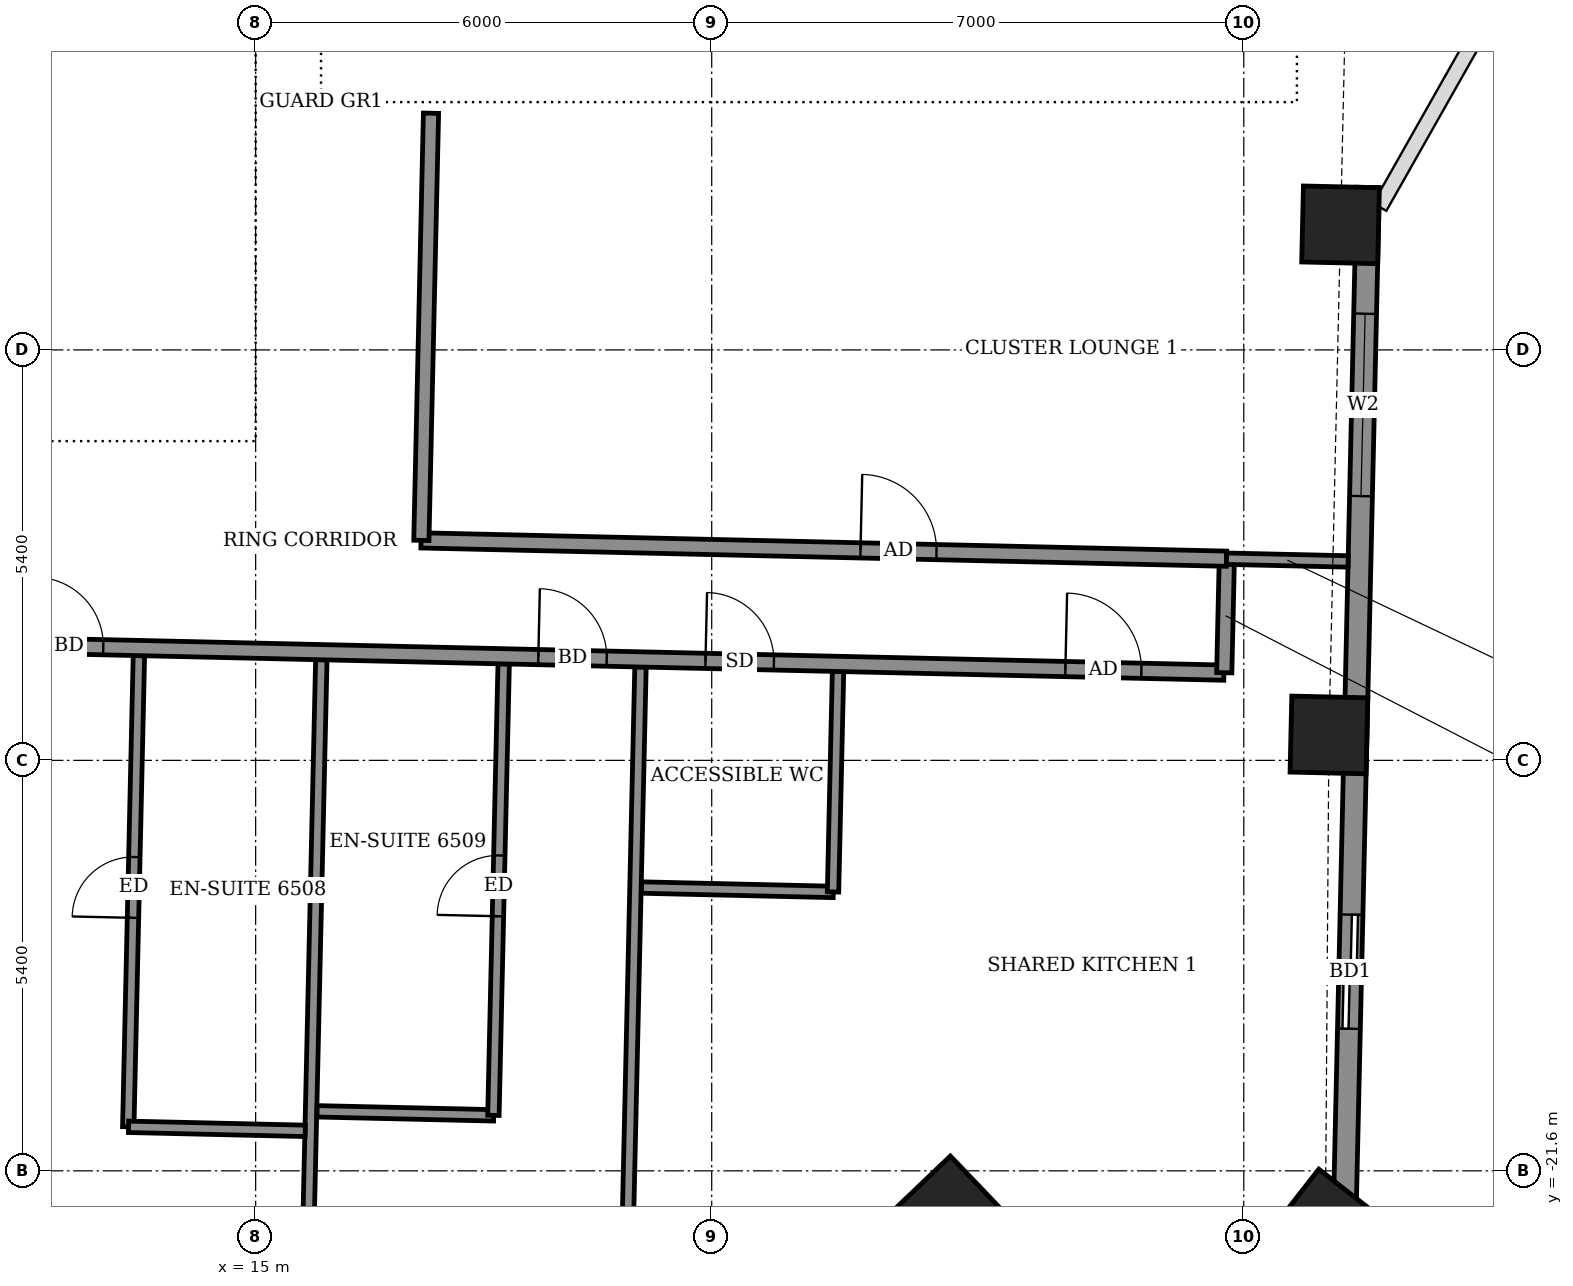
"""IFC4 building model, lengths in metres.
Left out: names, types, materials, properties, quantities, classifications, styles, units other than length and angle.
Written with IfcOpenShell. Run it as: python <this file> out.ifc"""

import sys

from ifc_helpers import new_model, si_unit, direction, frame, frame_2d, origin, origin_2d, place, context, subcontext, project, spatial, rectangle, extrude, element, fill, save


model = new_model("IFC4")
c1 = context("Model", 3, precision=1e-05, world=origin(), true_north=direction((0.0, 1.0)))
c2 = subcontext(c1, "Body", "Model", "MODEL_VIEW")
j1 = project(units=[si_unit("LENGTHUNIT", "METRE"), si_unit("PLANEANGLEUNIT", "RADIAN")], contexts=[c1])
p1 = place(None, origin())
s1 = spatial("IfcSite", under=j1, at=p1, CompositionType="ELEMENT")
p2 = place(p1, origin())
s2 = spatial("IfcBuilding", under=s1, at=p2, CompositionType="ELEMENT")
p3 = place(p2, frame((0.0, 0.0, 257.3)))
s3 = spatial("IfcBuildingStorey", under=s2, at=p3, CompositionType="ELEMENT", Elevation=257.3)
for number, where, z_axis, x_axis in (
    (1, (24.124, -22.113, -0.55), (0.0, 0.0, 1.0), (0.723, 0.691, 0.0)),
    (2, (29.074, -22.28, -0.55), (0.0, 0.0, 1.0), (0.615, 0.788, 0.0)),
    (3, (29.12, -15.866, -0.55), (0.0, 0.0, 1.0), (0.023, 1.0, 0.0)),
    (4, (29.273, -9.155, -0.55), (0.0, 0.0, 1.0), (0.023, 1.0, 0.0)),
):
    element("IfcColumn", number, at=place(p3, frame(where, z_axis=z_axis, x_axis=x_axis)), inside=s3, PredefinedType="COLUMN", context=c2, shape_type="SweptSolid", body=[
        extrude(rectangle(XDim=1.0, YDim=1.0, at=origin_2d()), origin(), (0.0, 0.0, 1.0), 3.6),
    ])
p4 = place(p3, frame((29.322, -22.434, 0.0), z_axis=(0.0, 0.0, 1.0), x_axis=(0.022651350875, 0.999743425236, 0.0)))
e5 = element("IfcWall", 5, at=p4, inside=s3, PredefinedType="SOLIDWALL", context=c2, shape_type="SweptSolid", body=[
    extrude(rectangle(XDim=13.774, YDim=0.3, at=frame_2d((6.887, 0.0))), origin(), (0.0, 0.0, 1.0), 2.55),
])
p5 = place(p4, frame((2.705, 0.0, 0.0)))
e6 = element("IfcOpeningElement", 6, at=p5, cuts=e5, PredefinedType="OPENING", context=c2, shape_type="SweptSolid", body=[
    extrude(rectangle(XDim=1.5, YDim=2.4, at=frame_2d((0.75, 1.2))), frame((0.0, 0.16, 0.0), z_axis=(0.0, -1.0, 0.0), x_axis=(1.0, 0.0, 0.0)), (0.0, 0.0, 1.0), 0.32),
])
p6 = place(p4, frame((9.713, 0.0, 0.9)))
e7 = element("IfcOpeningElement", 7, at=p6, cuts=e5, PredefinedType="OPENING", context=c2, shape_type="SweptSolid", body=[
    extrude(rectangle(XDim=2.4, YDim=1.5, at=frame_2d((1.2, 0.75))), frame((0.0, 0.16, 0.0), z_axis=(0.0, -1.0, 0.0), x_axis=(1.0, 0.0, 0.0)), (0.0, 0.0, 1.0), 0.32),
])
p7 = place(p3, frame((15.589, -26.974, 0.0), z_axis=(0.0, 0.0, 1.0), x_axis=(0.022718655443, 0.999741898039, 0.0)))
e8 = element("IfcWall", 8, at=p7, inside=s3, PredefinedType="PARTITIONING", context=c2, shape_type="SweptSolid", body=[
    extrude(rectangle(XDim=12.1, YDim=0.15, at=frame_2d((6.05, 0.0))), origin(), (0.0, 0.0, 1.0), 2.55),
])
p8 = place(p3, frame((19.788, -27.07, 0.0), z_axis=(0.0, 0.0, 1.0), x_axis=(0.022716822539, 0.999741939689, 0.0)))
e9 = element("IfcWall", 9, at=p8, inside=s3, PredefinedType="PARTITIONING", context=c2, shape_type="SweptSolid", body=[
    extrude(rectangle(XDim=12.101, YDim=0.15, at=frame_2d((6.051, 0.0))), origin(), (0.0, 0.0, 1.0), 2.55),
])
p9 = place(p3, frame((13.324, -21.021, 0.0), z_axis=(0.0, 0.0, 1.0), x_axis=(0.022604220207, 0.999744491972, 0.0)))
e10 = element("IfcWall", 10, at=p9, inside=s3, PredefinedType="PARTITIONING", context=c2, shape_type="SweptSolid", body=[
    extrude(rectangle(XDim=6.199, YDim=0.15, at=frame_2d((3.1, 0.0))), origin(), (0.0, 0.0, 1.0), 3.05),
])
p10 = place(p9, frame((2.75, 0.0, 0.0)))
e11 = element("IfcOpeningElement", 11, at=p10, cuts=e10, PredefinedType="OPENING", context=c2, shape_type="SweptSolid", body=[
    extrude(rectangle(XDim=0.8, YDim=2.1, at=frame_2d((0.4, 1.05))), frame((0.0, 0.085, 0.0), z_axis=(0.0, -1.0, 0.0), x_axis=(1.0, 0.0, 0.0)), (0.0, 0.0, 1.0), 0.17),
])
p11 = place(p3, frame((13.328, -21.021, 0.0), z_axis=(0.0, 0.0, 1.0), x_axis=(0.99974031529, -0.022788198363, 0.0)))
e12 = element("IfcWall", 12, at=p11, inside=s3, PredefinedType="PARTITIONING", context=c2, shape_type="SweptSolid", body=[
    extrude(rectangle(XDim=2.325, YDim=0.15, at=frame_2d((1.162, 0.0))), origin(), (0.0, 0.0, 1.0), 3.05),
])
p12 = place(p3, frame((15.808, -20.817, 0.0), z_axis=(0.0, 0.0, 1.0), x_axis=(0.999737862264, -0.022895561926, 0.0)))
e13 = element("IfcWall", 13, at=p12, inside=s3, PredefinedType="PARTITIONING", context=c2, shape_type="SweptSolid", body=[
    extrude(rectangle(XDim=2.324, YDim=0.15, at=frame_2d((1.162, 0.0))), origin(), (0.0, 0.0, 1.0), 3.05),
])
p13 = place(p3, frame((18.128, -20.87, 0.0), z_axis=(0.0, 0.0, 1.0), x_axis=(0.022726072939, 0.999741729453, 0.0)))
e14 = element("IfcWall", 14, at=p13, inside=s3, PredefinedType="PARTITIONING", context=c2, shape_type="SweptSolid", body=[
    extrude(rectangle(XDim=5.941, YDim=0.15, at=frame_2d((2.97, 0.0))), origin(), (0.0, 0.0, 1.0), 3.05),
])
p14 = place(p13, frame((2.62, 0.0, 0.0)))
e15 = element("IfcOpeningElement", 15, at=p14, cuts=e14, PredefinedType="OPENING", context=c2, shape_type="SweptSolid", body=[
    extrude(rectangle(XDim=0.8, YDim=2.1, at=frame_2d((0.4, 1.05))), frame((0.0, 0.085, 0.0), z_axis=(0.0, -1.0, 0.0), x_axis=(1.0, 0.0, 0.0)), (0.0, 0.0, 1.0), 0.17),
])
p15 = place(p3, frame((20.076, -17.873, 0.0), z_axis=(0.0, 0.0, 1.0), x_axis=(0.99973737352, -0.022916893077, 0.0)))
e16 = element("IfcWall", 16, at=p15, inside=s3, PredefinedType="PARTITIONING", context=c2, shape_type="SweptSolid", body=[
    extrude(rectangle(XDim=2.525, YDim=0.15, at=frame_2d((1.262, 0.0))), origin(), (0.0, 0.0, 1.0), 3.05),
])
p16 = place(p3, frame((22.596, -17.931, 0.0), z_axis=(0.0, 0.0, 1.0), x_axis=(0.022809352981, 0.999739832865, 0.0)))
e17 = element("IfcWall", 17, at=p16, inside=s3, PredefinedType="PARTITIONING", context=c2, shape_type="SweptSolid", body=[
    extrude(rectangle(XDim=2.901, YDim=0.15, at=frame_2d((1.45, 0.0))), origin(), (0.0, 0.0, 1.0), 3.05),
])
p17 = place(p3, frame((-25.12, -13.847, 0.0), z_axis=(0.0, 0.0, 1.0), x_axis=(0.999742852445, -0.022676617578, 0.0)))
e18 = element("IfcWall", 18, at=p17, inside=s3, PredefinedType="PARTITIONING", context=c2, shape_type="SweptSolid", body=[
    extrude(rectangle(XDim=52.873, YDim=0.2, at=frame_2d((26.437, 0.0))), origin(), (0.0, 0.0, 1.0), 3.05),
])
p18 = place(p17, frame((0.725, 0.0, 0.0)))
e19 = element("IfcOpeningElement", 19, at=p18, cuts=e18, PredefinedType="OPENING", context=c2, shape_type="SweptSolid", body=[
    extrude(rectangle(XDim=1.0, YDim=2.1, at=frame_2d((0.5, 1.05))), frame((0.0, 0.11, 0.0), z_axis=(0.0, -1.0, 0.0), x_axis=(1.0, 0.0, 0.0)), (0.0, 0.0, 1.0), 0.22),
])
p19 = place(p17, frame((5.1, 0.0, 0.0)))
e20 = element("IfcOpeningElement", 20, at=p19, cuts=e18, PredefinedType="OPENING", context=c2, shape_type="SweptSolid", body=[
    extrude(rectangle(XDim=0.9, YDim=2.1, at=frame_2d((0.45, 1.05))), frame((0.0, 0.11, 0.0), z_axis=(0.0, -1.0, 0.0), x_axis=(1.0, 0.0, 0.0)), (0.0, 0.0, 1.0), 0.22),
])
p20 = place(p17, frame((9.6, 0.0, 0.0)))
e21 = element("IfcOpeningElement", 21, at=p20, cuts=e18, PredefinedType="OPENING", context=c2, shape_type="SweptSolid", body=[
    extrude(rectangle(XDim=0.9, YDim=2.1, at=frame_2d((0.45, 1.05))), frame((0.0, 0.11, 0.0), z_axis=(0.0, -1.0, 0.0), x_axis=(1.0, 0.0, 0.0)), (0.0, 0.0, 1.0), 0.22),
])
p21 = place(p17, frame((11.45, 0.0, 0.0)))
e22 = element("IfcOpeningElement", 22, at=p21, cuts=e18, PredefinedType="OPENING", context=c2, shape_type="SweptSolid", body=[
    extrude(rectangle(XDim=0.9, YDim=2.1, at=frame_2d((0.45, 1.05))), frame((0.0, 0.11, 0.0), z_axis=(0.0, -1.0, 0.0), x_axis=(1.0, 0.0, 0.0)), (0.0, 0.0, 1.0), 0.22),
])
p22 = place(p17, frame((18.15, 0.0, 0.0)))
e23 = element("IfcOpeningElement", 23, at=p22, cuts=e18, PredefinedType="OPENING", context=c2, shape_type="SweptSolid", body=[
    extrude(rectangle(XDim=0.9, YDim=2.1, at=frame_2d((0.45, 1.05))), frame((0.0, 0.11, 0.0), z_axis=(0.0, -1.0, 0.0), x_axis=(1.0, 0.0, 0.0)), (0.0, 0.0, 1.0), 0.22),
])
p23 = place(p17, frame((20.05, 0.0, 0.0)))
e24 = element("IfcOpeningElement", 24, at=p23, cuts=e18, PredefinedType="OPENING", context=c2, shape_type="SweptSolid", body=[
    extrude(rectangle(XDim=0.9, YDim=2.1, at=frame_2d((0.45, 1.05))), frame((0.0, 0.11, 0.0), z_axis=(0.0, -1.0, 0.0), x_axis=(1.0, 0.0, 0.0)), (0.0, 0.0, 1.0), 0.22),
])
p24 = place(p17, frame((26.775, 0.0, 0.0)))
e25 = element("IfcOpeningElement", 25, at=p24, cuts=e18, PredefinedType="OPENING", context=c2, shape_type="SweptSolid", body=[
    extrude(rectangle(XDim=0.9, YDim=2.1, at=frame_2d((0.45, 1.05))), frame((0.0, 0.11, 0.0), z_axis=(0.0, -1.0, 0.0), x_axis=(1.0, 0.0, 0.0)), (0.0, 0.0, 1.0), 0.22),
])
p25 = place(p17, frame((28.675, 0.0, 0.0)))
e26 = element("IfcOpeningElement", 26, at=p25, cuts=e18, PredefinedType="OPENING", context=c2, shape_type="SweptSolid", body=[
    extrude(rectangle(XDim=0.9, YDim=2.1, at=frame_2d((0.45, 1.05))), frame((0.0, 0.11, 0.0), z_axis=(0.0, -1.0, 0.0), x_axis=(1.0, 0.0, 0.0)), (0.0, 0.0, 1.0), 0.22),
])
p26 = place(p17, frame((35.35, 0.0, 0.0)))
e27 = element("IfcOpeningElement", 27, at=p26, cuts=e18, PredefinedType="OPENING", context=c2, shape_type="SweptSolid", body=[
    extrude(rectangle(XDim=0.9, YDim=2.1, at=frame_2d((0.45, 1.05))), frame((0.0, 0.11, 0.0), z_axis=(0.0, -1.0, 0.0), x_axis=(1.0, 0.0, 0.0)), (0.0, 0.0, 1.0), 0.22),
])
p27 = place(p17, frame((37.225, 0.0, 0.0)))
e28 = element("IfcOpeningElement", 28, at=p27, cuts=e18, PredefinedType="OPENING", context=c2, shape_type="SweptSolid", body=[
    extrude(rectangle(XDim=0.9, YDim=2.1, at=frame_2d((0.45, 1.05))), frame((0.0, 0.11, 0.0), z_axis=(0.0, -1.0, 0.0), x_axis=(1.0, 0.0, 0.0)), (0.0, 0.0, 1.0), 0.22),
])
p28 = place(p17, frame((43.85, 0.0, 0.0)))
e29 = element("IfcOpeningElement", 29, at=p28, cuts=e18, PredefinedType="OPENING", context=c2, shape_type="SweptSolid", body=[
    extrude(rectangle(XDim=0.9, YDim=2.1, at=frame_2d((0.45, 1.05))), frame((0.0, 0.11, 0.0), z_axis=(0.0, -1.0, 0.0), x_axis=(1.0, 0.0, 0.0)), (0.0, 0.0, 1.0), 0.22),
])
p29 = place(p17, frame((50.786, 0.0, 0.0)))
e30 = element("IfcOpeningElement", 30, at=p29, cuts=e18, PredefinedType="OPENING", context=c2, shape_type="SweptSolid", body=[
    extrude(rectangle(XDim=1.0, YDim=2.1, at=frame_2d((0.5, 1.05))), frame((0.0, 0.11, 0.0), z_axis=(0.0, -1.0, 0.0), x_axis=(1.0, 0.0, 0.0)), (0.0, 0.0, 1.0), 0.22),
])
p30 = place(p17, frame((46.05, 0.0, 0.0)))
e31 = element("IfcOpeningElement", 31, at=p30, cuts=e18, PredefinedType="OPENING", context=c2, shape_type="SweptSolid", body=[
    extrude(rectangle(XDim=0.9, YDim=2.1, at=frame_2d((0.45, 1.05))), frame((0.0, 0.11, 0.0), z_axis=(0.0, -1.0, 0.0), x_axis=(1.0, 0.0, 0.0)), (0.0, 0.0, 1.0), 0.22),
])
p31 = place(p3, frame((27.743, -15.047, 0.0), z_axis=(0.0, 0.0, 1.0), x_axis=(0.022780545013, 0.999740489712, 0.0)))
e32 = element("IfcWall", 32, at=p31, inside=s3, PredefinedType="PARTITIONING", context=c2, shape_type="SweptSolid", body=[
    extrude(rectangle(XDim=1.5, YDim=0.2, at=frame_2d((0.75, 0.0))), origin(), (0.0, 0.0, 1.0), 3.05),
])
p32 = place(p3, frame((17.176, -13.306, 0.0), z_axis=(0.0, 0.0, 1.0), x_axis=(0.999741038234, -0.022756459988, 0.0)))
e33 = element("IfcWall", 33, at=p32, inside=s3, PredefinedType="PARTITIONING", context=c2, shape_type="SweptSolid", body=[
    extrude(rectangle(XDim=10.6, YDim=0.2, at=frame_2d((5.3, 0.0))), origin(), (0.0, 0.0, 1.0), 3.05),
])
p33 = place(p32, frame((5.783, 0.0, 0.0)))
e34 = element("IfcOpeningElement", 34, at=p33, cuts=e33, PredefinedType="OPENING", context=c2, shape_type="SweptSolid", body=[
    extrude(rectangle(XDim=1.0, YDim=2.1, at=frame_2d((0.5, 1.05))), frame((0.0, 0.11, 0.0), z_axis=(0.0, -1.0, 0.0), x_axis=(1.0, 0.0, 0.0)), (0.0, 0.0, 1.0), 0.22),
])
p34 = place(p3, frame((17.18, -13.306, 0.0), z_axis=(0.0, 0.0, 1.0), x_axis=(0.022584272568, 0.999744942789, 0.0)))
e35 = element("IfcWall", 35, at=p34, inside=s3, PredefinedType="PARTITIONING", context=c2, shape_type="SweptSolid", body=[
    extrude(rectangle(XDim=5.621, YDim=0.2, at=frame_2d((2.811, 0.0))), origin(), (0.0, 0.0, 1.0), 3.05),
])
p35 = place(p3, frame((27.773, -13.547, 0.0), z_axis=(0.0, 0.0, 1.0), x_axis=(0.999748563699, -0.022423411484, 0.0)))
e36 = element("IfcWall", 36, at=p35, inside=s3, PredefinedType="PARTITIONING", context=c2, shape_type="SweptSolid", body=[
    extrude(rectangle(XDim=1.601, YDim=0.15, at=frame_2d((0.8, 0.0))), origin(), (0.0, 0.0, 1.0), 2.55),
])
p36 = place(p3, frame((-14.5, -11.15, 0.0), z_axis=(0.0, 0.0, 1.0), x_axis=(1.0, 0.0, 0.0)))
e37 = element("IfcWall", 37, at=p36, inside=s3, PredefinedType="SHEAR", context=c2, shape_type="SweptSolid", body=[
    extrude(rectangle(XDim=29.0, YDim=0.7, at=frame_2d((14.5, 0.0))), origin(), (0.0, 0.0, 1.0), 3.6),
])
p37 = place(p3, frame((14.15, -10.8, 0.0), z_axis=(0.0, 0.0, 1.0), x_axis=(0.0, 1.0, 0.0)))
e38 = element("IfcWall", 38, at=p37, inside=s3, PredefinedType="SHEAR", context=c2, shape_type="SweptSolid", body=[
    extrude(rectangle(XDim=21.6, YDim=0.7, at=frame_2d((10.8, 0.0))), origin(), (0.0, 0.0, 1.0), 3.6),
])
p38 = place(p37, frame((1.2, 0.0, 0.0)))
e39 = element("IfcOpeningElement", 39, at=p38, cuts=e38, PredefinedType="OPENING", context=c2, shape_type="SweptSolid", body=[
    extrude(rectangle(XDim=1.2, YDim=2.1, at=frame_2d((0.6, 1.05))), frame((0.0, 0.36, 0.0), z_axis=(0.0, -1.0, 0.0), x_axis=(1.0, 0.0, 0.0)), (0.0, 0.0, 1.0), 0.72),
])
p39 = place(p5, origin())
e40 = element("IfcDoor", 40, at=p39, inside=s3, OperationType="SLIDING_TO_LEFT", PredefinedType="DOOR", context=c2, shape_type="SweptSolid", body=[
    extrude(rectangle(XDim=1.5, YDim=2.4, at=frame_2d((0.75, 1.2))), frame((0.0, 0.025, 0.0), z_axis=(0.0, -1.0, 0.0), x_axis=(1.0, 0.0, 0.0)), (0.0, 0.0, 1.0), 0.05),
])
fill(e6, e40)
p40 = place(p6, origin())
e41 = element("IfcWindow", 41, at=p40, inside=s3, PartitioningType="DOUBLE_PANEL_VERTICAL", PredefinedType="WINDOW", context=c2, shape_type="SweptSolid", body=[
    extrude(rectangle(XDim=2.4, YDim=1.5, at=frame_2d((1.2, 0.75))), frame((0.0, 0.03, 0.0), z_axis=(0.0, -1.0, 0.0), x_axis=(1.0, 0.0, 0.0)), (0.0, 0.0, 1.0), 0.06),
])
fill(e7, e41)
p41 = place(p27, origin())
e42 = element("IfcDoor", 42, at=p41, inside=s3, OperationType="SINGLE_SWING_RIGHT", PredefinedType="DOOR", context=c2, shape_type="SweptSolid", body=[
    extrude(rectangle(XDim=0.9, YDim=2.1, at=frame_2d((0.45, 1.05))), frame((0.0, 0.025, 0.0), z_axis=(0.0, -1.0, 0.0), x_axis=(1.0, 0.0, 0.0)), (0.0, 0.0, 1.0), 0.05),
])
fill(e28, e42)
p42 = place(p10, origin())
e43 = element("IfcDoor", 43, at=p42, inside=s3, OperationType="SINGLE_SWING_RIGHT", PredefinedType="DOOR", context=c2, shape_type="SweptSolid", body=[
    extrude(rectangle(XDim=0.8, YDim=2.1, at=frame_2d((0.4, 1.05))), frame((0.0, 0.025, 0.0), z_axis=(0.0, -1.0, 0.0), x_axis=(1.0, 0.0, 0.0)), (0.0, 0.0, 1.0), 0.05),
])
fill(e11, e43)
p43 = place(p28, origin())
e44 = element("IfcDoor", 44, at=p43, inside=s3, OperationType="SINGLE_SWING_LEFT", PredefinedType="DOOR", context=c2, shape_type="SweptSolid", body=[
    extrude(rectangle(XDim=0.9, YDim=2.1, at=frame_2d((0.45, 1.05))), frame((0.0, 0.025, 0.0), z_axis=(0.0, -1.0, 0.0), x_axis=(1.0, 0.0, 0.0)), (0.0, 0.0, 1.0), 0.05),
])
fill(e29, e44)
p44 = place(p14, origin())
e45 = element("IfcDoor", 45, at=p44, inside=s3, OperationType="SINGLE_SWING_LEFT", PredefinedType="DOOR", context=c2, shape_type="SweptSolid", body=[
    extrude(rectangle(XDim=0.8, YDim=2.1, at=frame_2d((0.4, 1.05))), frame((0.0, 0.025, 0.0), z_axis=(0.0, -1.0, 0.0), x_axis=(1.0, 0.0, 0.0)), (0.0, 0.0, 1.0), 0.05),
])
fill(e15, e45)
p45 = place(p29, origin())
e46 = element("IfcDoor", 46, at=p45, inside=s3, OperationType="SINGLE_SWING_RIGHT", PredefinedType="DOOR", context=c2, shape_type="SweptSolid", body=[
    extrude(rectangle(XDim=1.0, YDim=2.1, at=frame_2d((0.5, 1.05))), frame((0.0, 0.025, 0.0), z_axis=(0.0, -1.0, 0.0), x_axis=(1.0, 0.0, 0.0)), (0.0, 0.0, 1.0), 0.05),
])
fill(e30, e46)
p46 = place(p30, origin())
e47 = element("IfcDoor", 47, at=p46, inside=s3, OperationType="SINGLE_SWING_RIGHT", PredefinedType="DOOR", context=c2, shape_type="SweptSolid", body=[
    extrude(rectangle(XDim=0.9, YDim=2.1, at=frame_2d((0.45, 1.05))), frame((0.0, 0.025, 0.0), z_axis=(0.0, -1.0, 0.0), x_axis=(1.0, 0.0, 0.0)), (0.0, 0.0, 1.0), 0.05),
])
fill(e31, e47)
p47 = place(p33, origin())
e48 = element("IfcDoor", 48, at=p47, inside=s3, OperationType="SINGLE_SWING_LEFT", PredefinedType="DOOR", context=c2, shape_type="SweptSolid", body=[
    extrude(rectangle(XDim=1.0, YDim=2.1, at=frame_2d((0.5, 1.05))), frame((0.0, 0.025, 0.0), z_axis=(0.0, -1.0, 0.0), x_axis=(1.0, 0.0, 0.0)), (0.0, 0.0, 1.0), 0.05),
])
fill(e34, e48)
p48 = place(p38, origin())
e49 = element("IfcDoor", 49, at=p48, inside=s3, OperationType="DOUBLE_DOOR_SINGLE_SWING", PredefinedType="DOOR", context=c2, shape_type="SweptSolid", body=[
    extrude(rectangle(XDim=1.2, YDim=2.1, at=frame_2d((0.6, 1.05))), frame((0.0, 0.025, 0.0), z_axis=(0.0, -1.0, 0.0), x_axis=(1.0, 0.0, 0.0)), (0.0, 0.0, 1.0), 0.05),
])
fill(e39, e49)
save(model, sys.argv[1])
